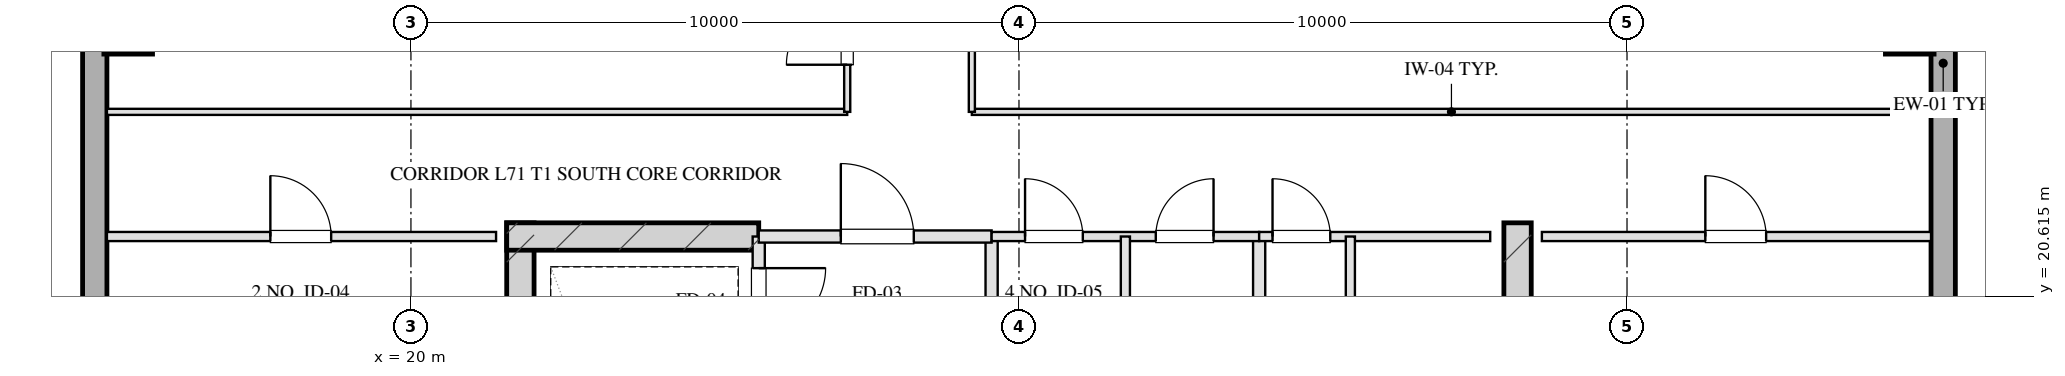
"""IFC4 building model, lengths in metres.
Left out: names, types, materials, properties, quantities, classifications, styles, units other than length and angle.
Written with IfcOpenShell. Run it as: python <this file> out.ifc"""

import sys

from ifc_helpers import new_model, si_unit, direction, frame, frame_2d, origin, origin_2d, place, context, subcontext, project, spatial, rectangle, hollow_rectangle, extrude, element, fill, save


model = new_model("IFC4")
c1 = context("Model", 3, precision=1e-05, world=origin(), true_north=direction((0.0, 1.0)))
c2 = subcontext(c1, "Body", "Model", "MODEL_VIEW")
j1 = project(units=[si_unit("LENGTHUNIT", "METRE"), si_unit("PLANEANGLEUNIT", "RADIAN")], contexts=[c1])
p1 = place(None, origin())
s1 = spatial("IfcSite", under=j1, at=p1, CompositionType="ELEMENT")
p2 = place(p1, origin())
s2 = spatial("IfcBuilding", under=s1, at=p2, CompositionType="ELEMENT")
p3 = place(p2, frame((0.0, 0.0, 260.0)))
s3 = spatial("IfcBuildingStorey", under=s2, at=p3, CompositionType="ELEMENT", Elevation=260.0)
for number, where, z_axis, x_axis in (
    (1, (21.8, 21.825, 0.0), (0.0, 0.0, 1.0), (0.0, -1.0, 0.0)),
    (2, (38.2, 21.825, 0.0), (0.0, 0.0, 1.0), (0.0, -1.0, 0.0)),
):
    element("IfcWall", number, at=place(p3, frame(where, z_axis=z_axis, x_axis=x_axis)), inside=s3, PredefinedType="SHEAR", context=c2, shape_type="SweptSolid", body=[
        extrude(rectangle(XDim=9.33, YDim=0.45, at=frame_2d((4.665, 0.0))), origin(), (0.0, 0.0, 1.0), 3.2),
    ])
p4 = place(p3, frame((21.575, 21.6, 0.0), z_axis=(0.0, 0.0, 1.0), x_axis=(1.0, 0.0, 0.0)))
e3 = element("IfcWall", 3, at=p4, inside=s3, PredefinedType="SHEAR", context=c2, shape_type="SweptSolid", body=[
    extrude(rectangle(XDim=4.145, YDim=0.45, at=frame_2d((2.073, 0.0))), origin(), (0.0, 0.0, 1.0), 3.2),
])
for number, where, z_axis, x_axis in (
    (4, (15.35, 25.0, 0.0), (0.0, 0.0, 1.0), (1.0, 0.0, 0.0)),
    (5, (44.65, 25.0, 0.0), (0.0, 0.0, 1.0), (1.0, 0.0, 0.0)),
):
    element("IfcColumn", number, at=place(p3, frame(where, z_axis=z_axis, x_axis=x_axis)), inside=s3, PredefinedType="COLUMN", context=c2, shape_type="SweptSolid", body=[
        extrude(hollow_rectangle(XDim=0.8, YDim=0.8, WallThickness=0.028, at=origin_2d()), origin(), (0.0, 0.0, 1.0), 3.201),
    ])
p5 = place(p3, frame((14.8, 13.1, 0.0), z_axis=(0.0, 0.0, 1.0), x_axis=(0.0, 1.0, 0.0)))
e6 = element("IfcWall", 6, at=p5, inside=s3, PredefinedType="SOLIDWALL", context=c2, shape_type="SweptSolid", body=[
    extrude(rectangle(XDim=41.8, YDim=0.4, at=frame_2d((20.9, 0.0))), origin(), (0.0, 0.0, 1.0), 2.36),
])
p6 = place(p5, frame((13.525, 0.0, 0.75)))
e7 = element("IfcOpeningElement", 7, at=p6, cuts=e6, PredefinedType="OPENING", context=c2, shape_type="SweptSolid", body=[
    extrude(rectangle(XDim=1.95, YDim=1.21, at=frame_2d((0.975, 0.605))), frame((0.0, 0.21, 0.0), z_axis=(0.0, -1.0, 0.0), x_axis=(1.0, 0.0, 0.0)), (0.0, 0.0, 1.0), 0.42),
])
p7 = place(p5, frame((17.325, 0.0, 0.75)))
e8 = element("IfcOpeningElement", 8, at=p7, cuts=e6, PredefinedType="OPENING", context=c2, shape_type="SweptSolid", body=[
    extrude(rectangle(XDim=1.95, YDim=1.21, at=frame_2d((0.975, 0.605))), frame((0.0, 0.21, 0.0), z_axis=(0.0, -1.0, 0.0), x_axis=(1.0, 0.0, 0.0)), (0.0, 0.0, 1.0), 0.42),
])
p8 = place(p5, frame((23.43, 0.0, 0.0)))
e9 = element("IfcOpeningElement", 9, at=p8, cuts=e6, PredefinedType="OPENING", context=c2, shape_type="SweptSolid", body=[
    extrude(rectangle(XDim=1.1, YDim=2.15, at=frame_2d((0.55, 1.075))), frame((0.0, 0.21, 0.0), z_axis=(0.0, -1.0, 0.0), x_axis=(1.0, 0.0, 0.0)), (0.0, 0.0, 1.0), 0.42),
])
p9 = place(p3, frame((45.2, 54.9, 0.0), z_axis=(0.0, 0.0, 1.0), x_axis=(0.0, -1.0, 0.0)))
e10 = element("IfcWall", 10, at=p9, inside=s3, PredefinedType="SOLIDWALL", context=c2, shape_type="SweptSolid", body=[
    extrude(rectangle(XDim=41.8, YDim=0.4, at=frame_2d((20.9, 0.0))), origin(), (0.0, 0.0, 1.0), 2.36),
])
p10 = place(p9, frame((26.325, 0.0, 0.75)))
e11 = element("IfcOpeningElement", 11, at=p10, cuts=e10, PredefinedType="OPENING", context=c2, shape_type="SweptSolid", body=[
    extrude(rectangle(XDim=1.95, YDim=1.21, at=frame_2d((0.975, 0.605))), frame((0.0, 0.21, 0.0), z_axis=(0.0, -1.0, 0.0), x_axis=(1.0, 0.0, 0.0)), (0.0, 0.0, 1.0), 0.42),
])
p11 = place(p9, frame((22.525, 0.0, 0.75)))
e12 = element("IfcOpeningElement", 12, at=p11, cuts=e10, PredefinedType="OPENING", context=c2, shape_type="SweptSolid", body=[
    extrude(rectangle(XDim=1.95, YDim=1.21, at=frame_2d((0.975, 0.605))), frame((0.0, 0.21, 0.0), z_axis=(0.0, -1.0, 0.0), x_axis=(1.0, 0.0, 0.0)), (0.0, 0.0, 1.0), 0.42),
])
p12 = place(p9, frame((17.25, 0.0, 0.0)))
e13 = element("IfcOpeningElement", 13, at=p12, cuts=e10, PredefinedType="OPENING", context=c2, shape_type="SweptSolid", body=[
    extrude(rectangle(XDim=1.1, YDim=2.15, at=frame_2d((0.55, 1.075))), frame((0.0, 0.21, 0.0), z_axis=(0.0, -1.0, 0.0), x_axis=(1.0, 0.0, 0.0)), (0.0, 0.0, 1.0), 0.42),
])
p13 = place(p3, frame((25.72, 21.6, 0.0), z_axis=(0.0, 0.0, 1.0), x_axis=(0.0, -1.0, 0.0)))
e14 = element("IfcWall", 14, at=p13, inside=s3, PredefinedType="PARTITIONING", context=c2, shape_type="SweptSolid", body=[
    extrude(rectangle(XDim=1.9, YDim=0.2, at=frame_2d((0.95, 0.0))), origin(), (0.0, 0.0, 1.0), 2.925),
])
p14 = place(p13, frame((0.52, 0.0, 0.0)))
e15 = element("IfcOpeningElement", 15, at=p14, cuts=e14, PredefinedType="OPENING", context=c2, shape_type="SweptSolid", body=[
    extrude(rectangle(XDim=1.1, YDim=2.05, at=frame_2d((0.55, 1.025))), frame((0.0, 0.11, 0.0), z_axis=(0.0, -1.0, 0.0), x_axis=(1.0, 0.0, 0.0)), (0.0, 0.0, 1.0), 0.22),
])
p15 = place(p3, frame((29.55, 21.6, 0.0), z_axis=(0.0, 0.0, 1.0), x_axis=(0.0, -1.0, 0.0)))
e16 = element("IfcWall", 16, at=p15, inside=s3, PredefinedType="PARTITIONING", context=c2, shape_type="SweptSolid", body=[
    extrude(rectangle(XDim=8.43, YDim=0.2, at=frame_2d((4.215, 0.0))), origin(), (0.0, 0.0, 1.0), 2.925),
])
p16 = place(p3, frame((25.72, 21.6, 0.0), z_axis=(0.0, 0.0, 1.0), x_axis=(1.0, 0.0, 0.0)))
e17 = element("IfcWall", 17, at=p16, inside=s3, PredefinedType="PARTITIONING", context=c2, shape_type="SweptSolid", body=[
    extrude(rectangle(XDim=3.83, YDim=0.2, at=frame_2d((1.915, 0.0))), origin(), (0.0, 0.0, 1.0), 2.925),
])
p17 = place(p16, frame((1.35, 0.0, 0.0)))
e18 = element("IfcOpeningElement", 18, at=p17, cuts=e17, PredefinedType="OPENING", context=c2, shape_type="SweptSolid", body=[
    extrude(rectangle(XDim=1.2, YDim=2.05, at=frame_2d((0.6, 1.025))), frame((0.0, 0.11, 0.0), z_axis=(0.0, -1.0, 0.0), x_axis=(1.0, 0.0, 0.0)), (0.0, 0.0, 1.0), 0.22),
])
p18 = place(p3, frame((33.95, 21.6, 0.0), z_axis=(0.0, 0.0, 1.0), x_axis=(0.0, -1.0, 0.0)))
e19 = element("IfcWall", 19, at=p18, inside=s3, PredefinedType="PARTITIONING", context=c2, shape_type="SweptSolid", body=[
    extrude(rectangle(XDim=8.43, YDim=0.2, at=frame_2d((4.215, 0.0))), origin(), (0.0, 0.0, 1.0), 2.925),
])
p19 = place(p3, frame((29.55, 21.6, 0.0), z_axis=(0.0, 0.0, 1.0), x_axis=(1.0, 0.0, 0.0)))
e20 = element("IfcWall", 20, at=p19, inside=s3, PredefinedType="PARTITIONING", context=c2, shape_type="SweptSolid", body=[
    extrude(rectangle(XDim=4.4, YDim=0.15, at=frame_2d((2.2, 0.0))), origin(), (0.0, 0.0, 1.0), 2.925),
])
p20 = place(p19, frame((0.55, 0.0, 0.0)))
e21 = element("IfcOpeningElement", 21, at=p20, cuts=e20, PredefinedType="OPENING", context=c2, shape_type="SweptSolid", body=[
    extrude(rectangle(XDim=0.95, YDim=2.05, at=frame_2d((0.475, 1.025))), frame((0.0, 0.085, 0.0), z_axis=(0.0, -1.0, 0.0), x_axis=(1.0, 0.0, 0.0)), (0.0, 0.0, 1.0), 0.17),
])
p21 = place(p19, frame((2.7, 0.0, 0.0)))
e22 = element("IfcOpeningElement", 22, at=p21, cuts=e20, PredefinedType="OPENING", context=c2, shape_type="SweptSolid", body=[
    extrude(rectangle(XDim=0.95, YDim=2.05, at=frame_2d((0.475, 1.025))), frame((0.0, 0.085, 0.0), z_axis=(0.0, -1.0, 0.0), x_axis=(1.0, 0.0, 0.0)), (0.0, 0.0, 1.0), 0.17),
])
p22 = place(p3, frame((31.75, 21.6, 0.0), z_axis=(0.0, 0.0, 1.0), x_axis=(0.0, -1.0, 0.0)))
e23 = element("IfcWall", 23, at=p22, inside=s3, PredefinedType="PARTITIONING", context=c2, shape_type="SweptSolid", body=[
    extrude(rectangle(XDim=8.43, YDim=0.15, at=frame_2d((4.215, 0.0))), origin(), (0.0, 0.0, 1.0), 2.925),
])
p23 = place(p3, frame((33.95, 21.6, 0.0), z_axis=(0.0, 0.0, 1.0), x_axis=(1.0, 0.0, 0.0)))
e24 = element("IfcWall", 24, at=p23, inside=s3, PredefinedType="PARTITIONING", context=c2, shape_type="SweptSolid", body=[
    extrude(rectangle(XDim=3.8, YDim=0.15, at=frame_2d((1.9, 0.0))), origin(), (0.0, 0.0, 1.0), 2.925),
])
p24 = place(p23, frame((0.22, 0.0, 0.0)))
e25 = element("IfcOpeningElement", 25, at=p24, cuts=e24, PredefinedType="OPENING", context=c2, shape_type="SweptSolid", body=[
    extrude(rectangle(XDim=0.95, YDim=2.05, at=frame_2d((0.475, 1.025))), frame((0.0, 0.085, 0.0), z_axis=(0.0, -1.0, 0.0), x_axis=(1.0, 0.0, 0.0)), (0.0, 0.0, 1.0), 0.17),
])
p25 = place(p3, frame((35.45, 21.6, 0.0), z_axis=(0.0, 0.0, 1.0), x_axis=(0.0, -1.0, 0.0)))
e26 = element("IfcWall", 26, at=p25, inside=s3, PredefinedType="PARTITIONING", context=c2, shape_type="SweptSolid", body=[
    extrude(rectangle(XDim=8.43, YDim=0.15, at=frame_2d((4.215, 0.0))), origin(), (0.0, 0.0, 1.0), 2.565),
])
p26 = place(p25, frame((2.55, 0.0, 0.0)))
e27 = element("IfcOpeningElement", 27, at=p26, cuts=e26, PredefinedType="OPENING", context=c2, shape_type="SweptSolid", body=[
    extrude(rectangle(XDim=0.95, YDim=2.05, at=frame_2d((0.475, 1.025))), frame((0.0, 0.085, 0.0), z_axis=(0.0, -1.0, 0.0), x_axis=(1.0, 0.0, 0.0)), (0.0, 0.0, 1.0), 0.17),
])
p27 = place(p25, frame((4.7, 0.0, 0.0)))
e28 = element("IfcOpeningElement", 28, at=p27, cuts=e26, PredefinedType="OPENING", context=c2, shape_type="SweptSolid", body=[
    extrude(rectangle(XDim=0.9, YDim=2.05, at=frame_2d((0.45, 1.025))), frame((0.0, 0.085, 0.0), z_axis=(0.0, -1.0, 0.0), x_axis=(1.0, 0.0, 0.0)), (0.0, 0.0, 1.0), 0.17),
])
p28 = place(p25, frame((6.8, 0.0, 0.0)))
e29 = element("IfcOpeningElement", 29, at=p28, cuts=e26, PredefinedType="OPENING", context=c2, shape_type="SweptSolid", body=[
    extrude(rectangle(XDim=0.9, YDim=2.05, at=frame_2d((0.45, 1.025))), frame((0.0, 0.085, 0.0), z_axis=(0.0, -1.0, 0.0), x_axis=(1.0, 0.0, 0.0)), (0.0, 0.0, 1.0), 0.17),
])
p29 = place(p3, frame((15.0, 21.6, 0.0), z_axis=(0.0, 0.0, 1.0), x_axis=(1.0, 0.0, 0.0)))
e30 = element("IfcWall", 30, at=p29, inside=s3, PredefinedType="PARTITIONING", context=c2, shape_type="SweptSolid", body=[
    extrude(rectangle(XDim=6.4, YDim=0.15, at=frame_2d((3.2, 0.0))), origin(), (0.0, 0.0, 1.0), 2.925),
])
p30 = place(p29, frame((2.688, 0.0, 0.0)))
e31 = element("IfcOpeningElement", 31, at=p30, cuts=e30, PredefinedType="OPENING", context=c2, shape_type="SweptSolid", body=[
    extrude(rectangle(XDim=1.0, YDim=2.05, at=frame_2d((0.5, 1.025))), frame((0.0, 0.085, 0.0), z_axis=(0.0, -1.0, 0.0), x_axis=(1.0, 0.0, 0.0)), (0.0, 0.0, 1.0), 0.17),
])
p31 = place(p3, frame((38.6, 21.6, 0.0), z_axis=(0.0, 0.0, 1.0), x_axis=(1.0, 0.0, 0.0)))
e32 = element("IfcWall", 32, at=p31, inside=s3, PredefinedType="PARTITIONING", context=c2, shape_type="SweptSolid", body=[
    extrude(rectangle(XDim=6.4, YDim=0.15, at=frame_2d((3.2, 0.0))), origin(), (0.0, 0.0, 1.0), 2.925),
])
p32 = place(p31, frame((2.688, 0.0, 0.0)))
e33 = element("IfcOpeningElement", 33, at=p32, cuts=e32, PredefinedType="OPENING", context=c2, shape_type="SweptSolid", body=[
    extrude(rectangle(XDim=1.0, YDim=2.05, at=frame_2d((0.5, 1.025))), frame((0.0, 0.085, 0.0), z_axis=(0.0, -1.0, 0.0), x_axis=(1.0, 0.0, 0.0)), (0.0, 0.0, 1.0), 0.17),
])
p33 = place(p3, frame((15.0, 23.65, 0.0), z_axis=(0.0, 0.0, 1.0), x_axis=(1.0, 0.0, 0.0)))
e34 = element("IfcWall", 34, at=p33, inside=s3, PredefinedType="MOVABLE", context=c2, shape_type="SweptSolid", body=[
    extrude(rectangle(XDim=12.175, YDim=0.1, at=frame_2d((6.087, 0.0))), origin(), (0.0, 0.0, 1.0), 2.925),
])
p34 = place(p3, frame((29.225, 23.65, 0.0), z_axis=(0.0, 0.0, 1.0), x_axis=(1.0, 0.0, 0.0)))
e35 = element("IfcWall", 35, at=p34, inside=s3, PredefinedType="MOVABLE", context=c2, shape_type="SweptSolid", body=[
    extrude(rectangle(XDim=15.775, YDim=0.1, at=frame_2d((7.887, 0.0))), origin(), (0.0, 0.0, 1.0), 2.925),
])
p35 = place(p3, frame((27.175, 23.65, 0.0), z_axis=(0.0, 0.0, 1.0), x_axis=(0.0, 1.0, 0.0)))
e36 = element("IfcWall", 36, at=p35, inside=s3, PredefinedType="MOVABLE", context=c2, shape_type="SweptSolid", body=[
    extrude(rectangle(XDim=20.7, YDim=0.1, at=frame_2d((10.35, 0.0))), origin(), (0.0, 0.0, 1.0), 2.925),
])
p36 = place(p35, frame((0.775, 0.0, 0.0)))
e37 = element("IfcOpeningElement", 37, at=p36, cuts=e36, PredefinedType="OPENING", context=c2, shape_type="SweptSolid", body=[
    extrude(rectangle(XDim=1.0, YDim=2.05, at=frame_2d((0.5, 1.025))), frame((0.0, 0.06, 0.0), z_axis=(0.0, -1.0, 0.0), x_axis=(1.0, 0.0, 0.0)), (0.0, 0.0, 1.0), 0.12),
])
p37 = place(p35, frame((3.95, 0.0, 0.0)))
e38 = element("IfcOpeningElement", 38, at=p37, cuts=e36, PredefinedType="OPENING", context=c2, shape_type="SweptSolid", body=[
    extrude(rectangle(XDim=0.85, YDim=2.05, at=frame_2d((0.425, 1.025))), frame((0.0, 0.06, 0.0), z_axis=(0.0, -1.0, 0.0), x_axis=(1.0, 0.0, 0.0)), (0.0, 0.0, 1.0), 0.12),
])
p38 = place(p35, frame((8.364, 0.0, 0.0)))
e39 = element("IfcOpeningElement", 39, at=p38, cuts=e36, PredefinedType="OPENING", context=c2, shape_type="SweptSolid", body=[
    extrude(rectangle(XDim=1.0, YDim=2.05, at=frame_2d((0.5, 1.025))), frame((0.0, 0.06, 0.0), z_axis=(0.0, -1.0, 0.0), x_axis=(1.0, 0.0, 0.0)), (0.0, 0.0, 1.0), 0.12),
])
p39 = place(p35, frame((12.844, 0.0, 0.0)))
e40 = element("IfcOpeningElement", 40, at=p39, cuts=e36, PredefinedType="OPENING", context=c2, shape_type="SweptSolid", body=[
    extrude(rectangle(XDim=1.0, YDim=2.05, at=frame_2d((0.5, 1.025))), frame((0.0, 0.06, 0.0), z_axis=(0.0, -1.0, 0.0), x_axis=(1.0, 0.0, 0.0)), (0.0, 0.0, 1.0), 0.12),
])
p40 = place(p35, frame((16.364, 0.0, 0.0)))
e41 = element("IfcOpeningElement", 41, at=p40, cuts=e36, PredefinedType="OPENING", context=c2, shape_type="SweptSolid", body=[
    extrude(rectangle(XDim=1.0, YDim=2.05, at=frame_2d((0.5, 1.025))), frame((0.0, 0.06, 0.0), z_axis=(0.0, -1.0, 0.0), x_axis=(1.0, 0.0, 0.0)), (0.0, 0.0, 1.0), 0.12),
])
p41 = place(p35, frame((19.058, 0.0, 0.0)))
e42 = element("IfcOpeningElement", 42, at=p41, cuts=e36, PredefinedType="OPENING", context=c2, shape_type="SweptSolid", body=[
    extrude(rectangle(XDim=1.05, YDim=2.05, at=frame_2d((0.525, 1.025))), frame((0.0, 0.06, 0.0), z_axis=(0.0, -1.0, 0.0), x_axis=(1.0, 0.0, 0.0)), (0.0, 0.0, 1.0), 0.12),
])
p42 = place(p3, frame((29.225, 23.65, 0.0), z_axis=(0.0, 0.0, 1.0), x_axis=(0.0, 1.0, 0.0)))
e43 = element("IfcWall", 43, at=p42, inside=s3, PredefinedType="MOVABLE", context=c2, shape_type="SweptSolid", body=[
    extrude(rectangle(XDim=20.7, YDim=0.1, at=frame_2d((10.35, 0.0))), origin(), (0.0, 0.0, 1.0), 2.925),
])
p43 = place(p42, frame((2.175, 0.0, 0.0)))
e44 = element("IfcOpeningElement", 44, at=p43, cuts=e43, PredefinedType="OPENING", context=c2, shape_type="SweptSolid", body=[
    extrude(rectangle(XDim=1.0, YDim=2.05, at=frame_2d((0.5, 1.025))), frame((0.0, 0.06, 0.0), z_axis=(0.0, -1.0, 0.0), x_axis=(1.0, 0.0, 0.0)), (0.0, 0.0, 1.0), 0.12),
])
p44 = place(p42, frame((7.69, 0.0, 0.0)))
e45 = element("IfcOpeningElement", 45, at=p44, cuts=e43, PredefinedType="OPENING", context=c2, shape_type="SweptSolid", body=[
    extrude(rectangle(XDim=1.0, YDim=2.05, at=frame_2d((0.5, 1.025))), frame((0.0, 0.06, 0.0), z_axis=(0.0, -1.0, 0.0), x_axis=(1.0, 0.0, 0.0)), (0.0, 0.0, 1.0), 0.12),
])
p45 = place(p42, frame((12.69, 0.0, 0.0)))
e46 = element("IfcOpeningElement", 46, at=p45, cuts=e43, PredefinedType="OPENING", context=c2, shape_type="SweptSolid", body=[
    extrude(rectangle(XDim=1.0, YDim=2.05, at=frame_2d((0.5, 1.025))), frame((0.0, 0.06, 0.0), z_axis=(0.0, -1.0, 0.0), x_axis=(1.0, 0.0, 0.0)), (0.0, 0.0, 1.0), 0.12),
])
p46 = place(p42, frame((17.525, 0.0, 0.0)))
e47 = element("IfcOpeningElement", 47, at=p46, cuts=e43, PredefinedType="OPENING", context=c2, shape_type="SweptSolid", body=[
    extrude(rectangle(XDim=1.0, YDim=2.05, at=frame_2d((0.5, 1.025))), frame((0.0, 0.06, 0.0), z_axis=(0.0, -1.0, 0.0), x_axis=(1.0, 0.0, 0.0)), (0.0, 0.0, 1.0), 0.12),
])
p47 = place(p14, origin())
e48 = element("IfcDoor", 48, at=p47, inside=s3, OperationType="SINGLE_SWING_LEFT", PredefinedType="DOOR", context=c2, shape_type="SweptSolid", body=[
    extrude(rectangle(XDim=1.1, YDim=2.05, at=frame_2d((0.55, 1.025))), frame((0.0, 0.025, 0.0), z_axis=(0.0, -1.0, 0.0), x_axis=(1.0, 0.0, 0.0)), (0.0, 0.0, 1.0), 0.05),
])
fill(e15, e48)
p48 = place(p17, origin())
e49 = element("IfcDoor", 49, at=p48, inside=s3, OperationType="SINGLE_SWING_LEFT", PredefinedType="DOOR", context=c2, shape_type="SweptSolid", body=[
    extrude(rectangle(XDim=1.2, YDim=2.05, at=frame_2d((0.6, 1.025))), frame((0.0, 0.025, 0.0), z_axis=(0.0, -1.0, 0.0), x_axis=(1.0, 0.0, 0.0)), (0.0, 0.0, 1.0), 0.05),
])
fill(e18, e49)
p49 = place(p20, origin())
e50 = element("IfcDoor", 50, at=p49, inside=s3, OperationType="SINGLE_SWING_LEFT", PredefinedType="DOOR", context=c2, shape_type="SweptSolid", body=[
    extrude(rectangle(XDim=0.95, YDim=2.05, at=frame_2d((0.475, 1.025))), frame((0.0, 0.025, 0.0), z_axis=(0.0, -1.0, 0.0), x_axis=(1.0, 0.0, 0.0)), (0.0, 0.0, 1.0), 0.05),
])
fill(e21, e50)
p50 = place(p21, origin())
e51 = element("IfcDoor", 51, at=p50, inside=s3, OperationType="SINGLE_SWING_RIGHT", PredefinedType="DOOR", context=c2, shape_type="SweptSolid", body=[
    extrude(rectangle(XDim=0.95, YDim=2.05, at=frame_2d((0.475, 1.025))), frame((0.0, 0.025, 0.0), z_axis=(0.0, -1.0, 0.0), x_axis=(1.0, 0.0, 0.0)), (0.0, 0.0, 1.0), 0.05),
])
fill(e22, e51)
p51 = place(p24, origin())
e52 = element("IfcDoor", 52, at=p51, inside=s3, OperationType="SINGLE_SWING_LEFT", PredefinedType="DOOR", context=c2, shape_type="SweptSolid", body=[
    extrude(rectangle(XDim=0.95, YDim=2.05, at=frame_2d((0.475, 1.025))), frame((0.0, 0.025, 0.0), z_axis=(0.0, -1.0, 0.0), x_axis=(1.0, 0.0, 0.0)), (0.0, 0.0, 1.0), 0.05),
])
fill(e25, e52)
p52 = place(p30, origin())
e53 = element("IfcDoor", 53, at=p52, inside=s3, OperationType="SINGLE_SWING_LEFT", PredefinedType="DOOR", context=c2, shape_type="SweptSolid", body=[
    extrude(rectangle(XDim=1.0, YDim=2.05, at=frame_2d((0.5, 1.025))), frame((0.0, 0.025, 0.0), z_axis=(0.0, -1.0, 0.0), x_axis=(1.0, 0.0, 0.0)), (0.0, 0.0, 1.0), 0.05),
])
fill(e31, e53)
p53 = place(p32, origin())
e54 = element("IfcDoor", 54, at=p53, inside=s3, OperationType="SINGLE_SWING_LEFT", PredefinedType="DOOR", context=c2, shape_type="SweptSolid", body=[
    extrude(rectangle(XDim=1.0, YDim=2.05, at=frame_2d((0.5, 1.025))), frame((0.0, 0.025, 0.0), z_axis=(0.0, -1.0, 0.0), x_axis=(1.0, 0.0, 0.0)), (0.0, 0.0, 1.0), 0.05),
])
fill(e33, e54)
p54 = place(p36, origin())
e55 = element("IfcDoor", 55, at=p54, inside=s3, OperationType="SINGLE_SWING_LEFT", PredefinedType="DOOR", context=c2, shape_type="SweptSolid", body=[
    extrude(rectangle(XDim=1.0, YDim=2.05, at=frame_2d((0.5, 1.025))), frame((0.0, 0.025, 0.0), z_axis=(0.0, -1.0, 0.0), x_axis=(1.0, 0.0, 0.0)), (0.0, 0.0, 1.0), 0.05),
])
fill(e37, e55)
save(model, sys.argv[1])
